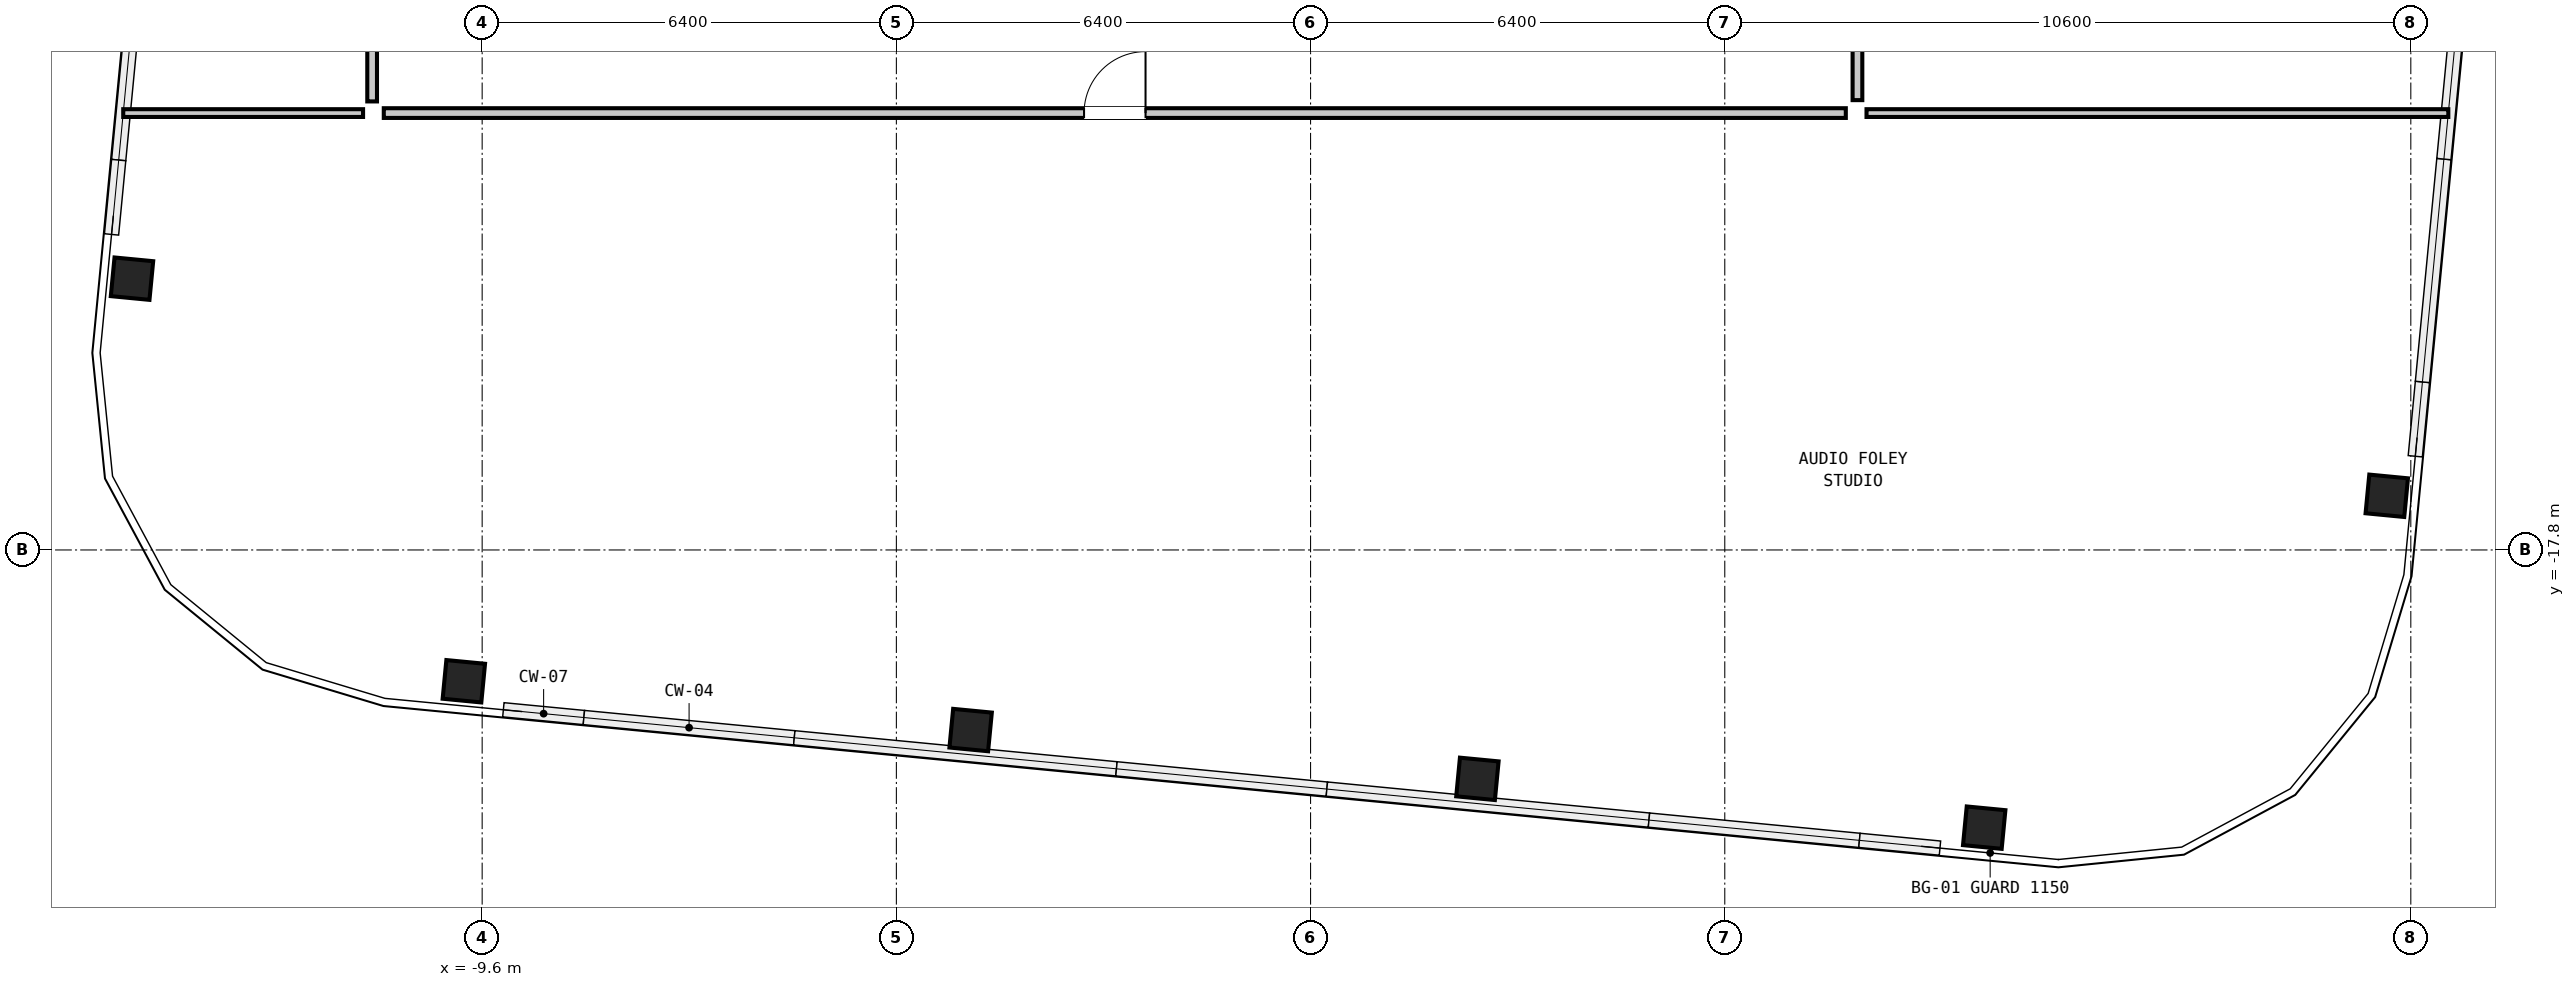
"""IFC4 building model, lengths in metres.
Left out: names, types, materials, properties, quantities, classifications, styles, units other than length and angle.
Written with IfcOpenShell. Run it as: python <this file> out.ifc"""

import sys

from ifc_helpers import new_model, si_unit, direction, frame, frame_2d, origin, origin_2d, place, context, subcontext, project, spatial, rectangle, hollow_rectangle, extrude, element, fill, save


model = new_model("IFC4")
c1 = context("Model", 3, precision=1e-05, world=origin(), true_north=direction((0.0, 1.0)))
c2 = subcontext(c1, "Body", "Model", "MODEL_VIEW")
j1 = project(units=[si_unit("LENGTHUNIT", "METRE"), si_unit("PLANEANGLEUNIT", "RADIAN")], contexts=[c1])
p1 = place(None, origin())
s1 = spatial("IfcSite", under=j1, at=p1, CompositionType="ELEMENT")
p2 = place(p1, origin())
s2 = spatial("IfcBuilding", under=s1, at=p2, CompositionType="ELEMENT")
p3 = place(p2, frame((0.0, 0.0, 245.9)))
s3 = spatial("IfcBuildingStorey", under=s2, at=p3, CompositionType="ELEMENT", Elevation=245.9)
for number, where, z_axis, x_axis in (
    (1, (-9.883, -19.829, 0.0), (0.0, 0.0, 1.0), (0.995, -0.096, 0.0)),
    (2, (-2.052, -20.583, 0.0), (0.0, 0.0, 1.0), (0.995, -0.096, 0.0)),
    (3, (5.778, -21.336, 0.0), (0.0, 0.0, 1.0), (0.995, -0.096, 0.0)),
    (4, (13.608, -22.09, 0.0), (0.0, 0.0, 1.0), (0.995, -0.096, 0.0)),
    (5, (19.829, -16.963, 0.0), (0.0, 0.0, 1.0), (0.096, 0.995, 0.0)),
    (6, (-15.01, -13.608, 0.0), (0.0, 0.0, 1.0), (0.096, 0.995, 0.0)),
):
    element("IfcColumn", number, at=place(p3, frame(where, z_axis=z_axis, x_axis=x_axis)), inside=s3, PredefinedType="COLUMN", context=c2, shape_type="SweptSolid", body=[
        extrude(hollow_rectangle(XDim=0.6, YDim=0.6, WallThickness=0.04, at=origin_2d()), origin(), (0.0, 0.0, 1.0), 3.05),
    ])
p4 = place(p3, frame((-15.146, -11.05, 0.0), z_axis=(0.0, 0.0, 1.0), x_axis=(1.0, 0.0, 0.0)))
e7 = element("IfcWall", 7, at=p4, inside=s3, PredefinedType="PARTITIONING", context=c2, shape_type="SweptSolid", body=[
    extrude(rectangle(XDim=3.706, YDim=0.12, at=frame_2d((1.853, 0.0))), origin(), (0.0, 0.0, 1.0), 2.86),
])
p5 = place(p3, frame((11.79, -11.05, 0.0), z_axis=(0.0, 0.0, 1.0), x_axis=(1.0, 0.0, 0.0)))
e8 = element("IfcWall", 8, at=p5, inside=s3, PredefinedType="PARTITIONING", context=c2, shape_type="SweptSolid", body=[
    extrude(rectangle(XDim=8.99, YDim=0.12, at=frame_2d((4.495, 0.0))), origin(), (0.0, 0.0, 1.0), 2.86),
])
p6 = place(p3, frame((-11.12, -11.05, 0.0), z_axis=(0.0, 0.0, 1.0), x_axis=(1.0, 0.0, 0.0)))
e9 = element("IfcWall", 9, at=p6, inside=s3, PredefinedType="PARTITIONING", context=c2, shape_type="SweptSolid", body=[
    extrude(rectangle(XDim=22.59, YDim=0.15, at=frame_2d((11.295, 0.0))), origin(), (0.0, 0.0, 1.0), 2.86),
])
p7 = place(p6, frame((10.82, 0.0, 0.0)))
e10 = element("IfcOpeningElement", 10, at=p7, cuts=e9, PredefinedType="OPENING", context=c2, shape_type="SweptSolid", body=[
    extrude(rectangle(XDim=0.95, YDim=2.1, at=frame_2d((0.475, 1.05))), frame((0.0, 0.087, 0.0), z_axis=(0.0, -1.0, 0.0), x_axis=(1.0, 0.0, 0.0)), (0.0, 0.0, 1.0), 0.174),
])
p8 = place(p3, frame((-11.3, 12.07, 0.0), z_axis=(0.0, 0.0, 1.0), x_axis=(0.0, -1.0, 0.0)))
e11 = element("IfcWall", 11, at=p8, inside=s3, PredefinedType="PARTITIONING", context=c2, shape_type="SweptSolid", body=[
    extrude(rectangle(XDim=22.94, YDim=0.15, at=frame_2d((11.47, 0.0))), origin(), (0.0, 0.0, 1.0), 2.86),
])
p9 = place(p8, frame((19.253, 0.0, 0.0)))
e12 = element("IfcOpeningElement", 12, at=p9, cuts=e11, PredefinedType="OPENING", context=c2, shape_type="SweptSolid", body=[
    extrude(rectangle(XDim=0.95, YDim=2.1, at=frame_2d((0.475, 1.05))), frame((0.0, 0.087, 0.0), z_axis=(0.0, -1.0, 0.0), x_axis=(1.0, 0.0, 0.0)), (0.0, 0.0, 1.0), 0.174),
])
p10 = place(p3, frame((11.65, -10.85, 0.0), z_axis=(0.0, 0.0, 1.0), x_axis=(0.0, 1.0, 0.0)))
e13 = element("IfcWall", 13, at=p10, inside=s3, PredefinedType="PARTITIONING", context=c2, shape_type="SweptSolid", body=[
    extrude(rectangle(XDim=8.29, YDim=0.15, at=frame_2d((4.145, 0.0))), origin(), (0.0, 0.0, 1.0), 2.86),
])
p11 = place(p10, frame((3.67, 0.0, 0.0)))
e14 = element("IfcOpeningElement", 14, at=p11, cuts=e13, PredefinedType="OPENING", context=c2, shape_type="SweptSolid", body=[
    extrude(rectangle(XDim=0.95, YDim=2.1, at=frame_2d((0.475, 1.05))), frame((0.0, 0.087, 0.0), z_axis=(0.0, -1.0, 0.0), x_axis=(1.0, 0.0, 0.0)), (0.0, 0.0, 1.0), 0.174),
])
p12 = place(p7, origin())
e15 = element("IfcDoor", 15, at=p12, inside=s3, OperationType="SINGLE_SWING_RIGHT", PredefinedType="DOOR", context=c2, shape_type="SweptSolid", body=[
    extrude(rectangle(XDim=0.95, YDim=2.1, at=frame_2d((0.475, 1.05))), frame((0.0, 0.025, 0.0), z_axis=(0.0, -1.0, 0.0), x_axis=(1.0, 0.0, 0.0)), (0.0, 0.0, 1.0), 0.05),
])
fill(e10, e15)
save(model, sys.argv[1])
